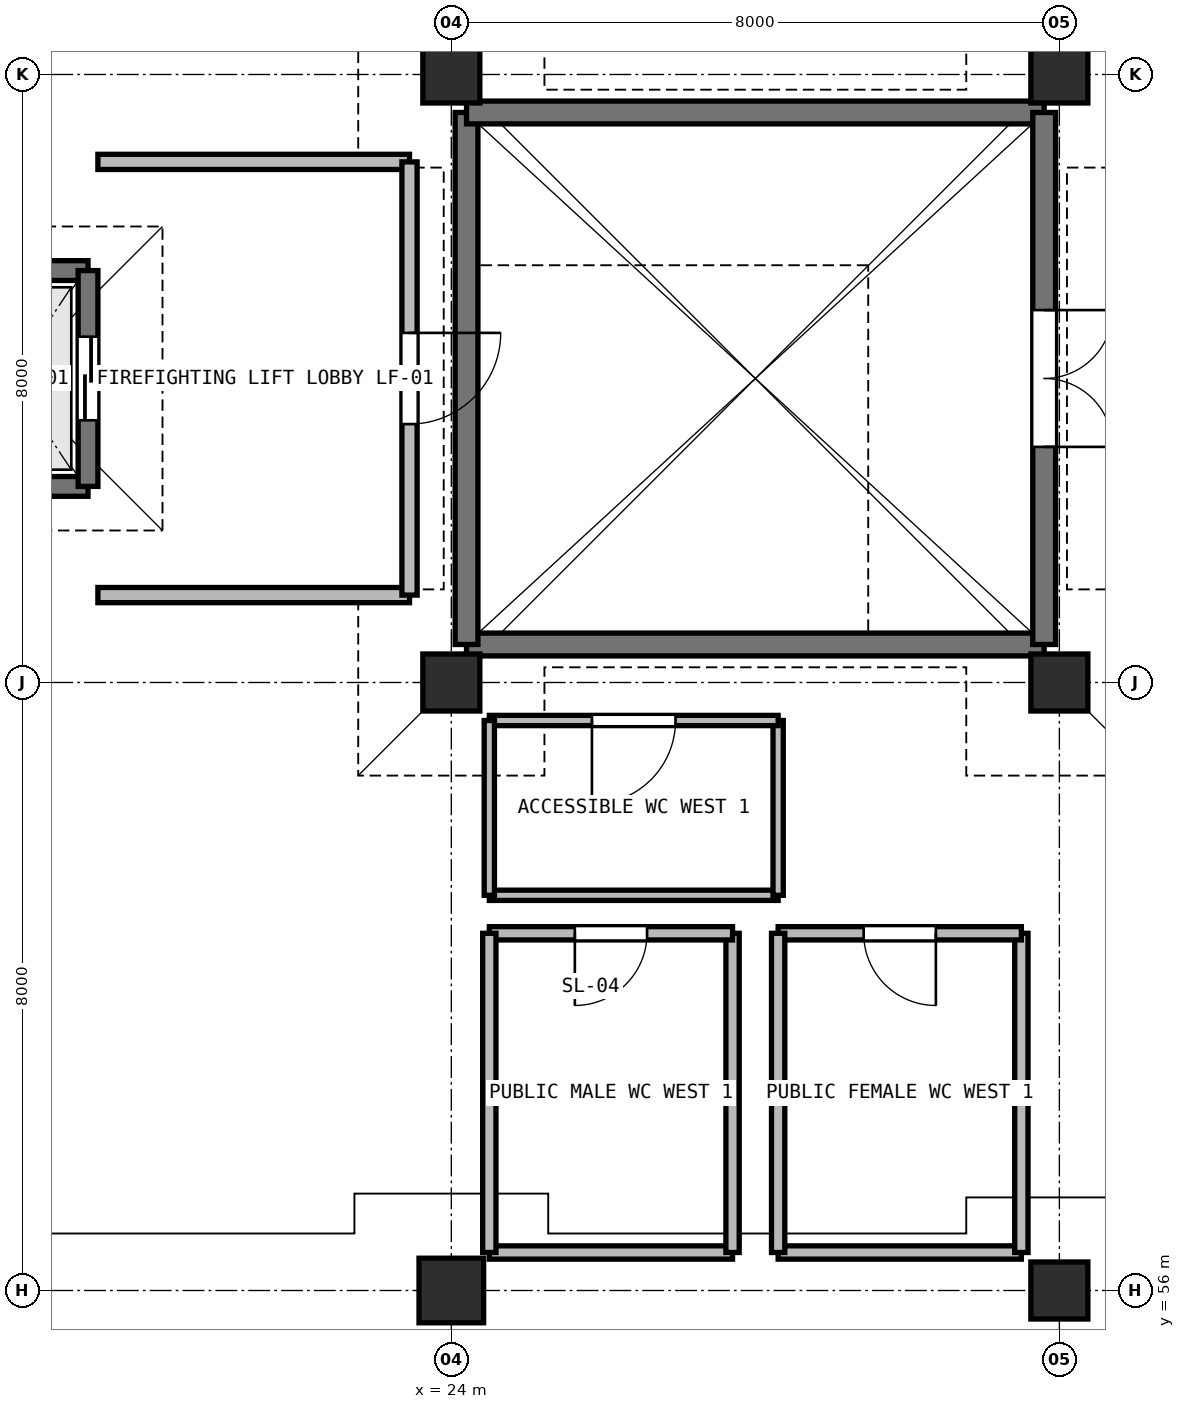
"""IFC4 building model, lengths in metres.
Left out: names, types, materials, properties, quantities, classifications, styles, units other than length and angle.
Written with IfcOpenShell. Run it as: python <this file> out.ifc"""

import sys

from ifc_helpers import new_model, si_unit, direction, frame, frame_2d, origin, origin_2d, place, context, subcontext, project, spatial, rectangle, extrude, element, fill, save


model = new_model("IFC4")
c1 = context("Model", 3, precision=1e-05, world=origin(), true_north=direction((0.0, 1.0)))
c2 = subcontext(c1, "Body", "Model", "MODEL_VIEW")
j1 = project(units=[si_unit("LENGTHUNIT", "METRE"), si_unit("PLANEANGLEUNIT", "RADIAN")], contexts=[c1])
p1 = place(None, origin())
s1 = spatial("IfcSite", under=j1, at=p1, CompositionType="ELEMENT")
p2 = place(p1, origin())
s2 = spatial("IfcBuilding", under=s1, at=p2, CompositionType="ELEMENT")
p3 = place(p2, frame((0.0, 0.0, 5.4)))
s3 = spatial("IfcBuildingStorey", under=s2, at=p3, CompositionType="ELEMENT", Elevation=5.4)
p4 = place(p3, frame((24.0, 56.0, 0.0), z_axis=(0.0, 0.0, 1.0), x_axis=(1.0, 0.0, 0.0)))
e1 = element("IfcColumn", 1, at=p4, inside=s3, PredefinedType="COLUMN", context=c2, shape_type="SweptSolid", body=[
    extrude(rectangle(XDim=0.85, YDim=0.85, at=origin_2d()), origin(), (0.0, 0.0, 1.0), 4.8),
])
for number, where, z_axis, x_axis in (
    (2, (24.0, 64.0, 0.0), (0.0, 0.0, 1.0), (1.0, 0.0, 0.0)),
    (3, (24.0, 72.0, 0.0), (0.0, 0.0, 1.0), (1.0, 0.0, 0.0)),
    (4, (32.0, 56.0, 0.0), (0.0, 0.0, 1.0), (1.0, 0.0, 0.0)),
    (5, (32.0, 64.0, 0.0), (0.0, 0.0, 1.0), (1.0, 0.0, 0.0)),
    (6, (32.0, 72.0, 0.0), (0.0, 0.0, 1.0), (1.0, 0.0, 0.0)),
):
    element("IfcColumn", number, at=place(p3, frame(where, z_axis=z_axis, x_axis=x_axis)), inside=s3, PredefinedType="COLUMN", context=c2, shape_type="SweptSolid", body=[
        extrude(rectangle(XDim=0.75, YDim=0.75, at=origin_2d()), origin(), (0.0, 0.0, 1.0), 4.8),
    ])
p5 = place(p3, frame((31.8, 64.5, 0.0), z_axis=(0.0, 0.0, 1.0), x_axis=(-1.0, 0.0, 0.0)))
e7 = element("IfcWall", 7, at=p5, inside=s3, PredefinedType="SHEAR", context=c2, shape_type="SweptSolid", body=[
    extrude(rectangle(XDim=7.6, YDim=0.3, at=frame_2d((3.8, 0.0))), origin(), (0.0, 0.0, 1.0), 4.48),
])
p6 = place(p3, frame((24.2, 64.5, 0.0), z_axis=(0.0, 0.0, 1.0), x_axis=(0.0, 1.0, 0.0)))
e8 = element("IfcWall", 8, at=p6, inside=s3, PredefinedType="SHEAR", context=c2, shape_type="SweptSolid", body=[
    extrude(rectangle(XDim=7.0, YDim=0.3, at=frame_2d((3.5, 0.0))), origin(), (0.0, 0.0, 1.0), 4.48),
])
p7 = place(p3, frame((24.2, 71.5, 0.0), z_axis=(0.0, 0.0, 1.0), x_axis=(1.0, 0.0, 0.0)))
e9 = element("IfcWall", 9, at=p7, inside=s3, PredefinedType="SHEAR", context=c2, shape_type="SweptSolid", body=[
    extrude(rectangle(XDim=7.6, YDim=0.3, at=frame_2d((3.8, 0.0))), origin(), (0.0, 0.0, 1.0), 4.48),
])
p8 = place(p3, frame((31.8, 71.5, 0.0), z_axis=(0.0, 0.0, 1.0), x_axis=(0.0, -1.0, 0.0)))
e10 = element("IfcWall", 10, at=p8, inside=s3, PredefinedType="SHEAR", context=c2, shape_type="SweptSolid", body=[
    extrude(rectangle(XDim=7.0, YDim=0.3, at=frame_2d((3.5, 0.0))), origin(), (0.0, 0.0, 1.0), 4.48),
])
p9 = place(p8, frame((2.6, 0.0, 0.0)))
e11 = element("IfcOpeningElement", 11, at=p9, cuts=e10, PredefinedType="OPENING", context=c2, shape_type="SweptSolid", body=[
    extrude(rectangle(XDim=1.8, YDim=2.2, at=frame_2d((0.9, 1.1))), frame((0.0, 0.16, 0.0), z_axis=(0.0, -1.0, 0.0), x_axis=(1.0, 0.0, 0.0)), (0.0, 0.0, 1.0), 0.32),
])
for number, where, z_axis, x_axis in (
    (12, (17.18, 69.42, 0.0), (0.0, 0.0, 1.0), (1.0, 0.0, 0.0)),
    (13, (19.22, 66.58, 0.0), (0.0, 0.0, 1.0), (-1.0, 0.0, 0.0)),
):
    element("IfcWall", number, at=place(p3, frame(where, z_axis=z_axis, x_axis=x_axis)), inside=s3, PredefinedType="SHEAR", context=c2, shape_type="SweptSolid", body=[
        extrude(rectangle(XDim=2.04, YDim=0.26, at=frame_2d((1.02, 0.0))), origin(), (0.0, 0.0, 1.0), 4.48),
    ])
p10 = place(p3, frame((19.22, 69.42, 0.0), z_axis=(0.0, 0.0, 1.0), x_axis=(0.0, -1.0, 0.0)))
e14 = element("IfcWall", 14, at=p10, inside=s3, PredefinedType="SHEAR", context=c2, shape_type="SweptSolid", body=[
    extrude(rectangle(XDim=2.84, YDim=0.26, at=frame_2d((1.42, 0.0))), origin(), (0.0, 0.0, 1.0), 4.48),
])
p11 = place(p10, frame((0.87, 0.0, 0.0)))
e15 = element("IfcOpeningElement", 15, at=p11, cuts=e14, PredefinedType="OPENING", context=c2, shape_type="SweptSolid", body=[
    extrude(rectangle(XDim=1.1, YDim=2.15, at=frame_2d((0.55, 1.075))), frame((0.0, 0.14, 0.0), z_axis=(0.0, -1.0, 0.0), x_axis=(1.0, 0.0, 0.0)), (0.0, 0.0, 1.0), 0.28),
])
for number, where, z_axis, x_axis in (
    (16, (19.35, 70.85, 0.0), (0.0, 0.0, 1.0), (1.0, 0.0, 0.0)),
    (17, (23.45, 65.15, 0.0), (0.0, 0.0, 1.0), (-1.0, 0.0, 0.0)),
):
    element("IfcWall", number, at=place(p3, frame(where, z_axis=z_axis, x_axis=x_axis)), inside=s3, PredefinedType="PARTITIONING", context=c2, shape_type="SweptSolid", body=[
        extrude(rectangle(XDim=4.1, YDim=0.2, at=frame_2d((2.05, 0.0))), origin(), (0.0, 0.0, 1.0), 4.48),
    ])
p12 = place(p3, frame((23.45, 70.85, 0.0), z_axis=(0.0, 0.0, 1.0), x_axis=(0.0, -1.0, 0.0)))
e18 = element("IfcWall", 18, at=p12, inside=s3, PredefinedType="PARTITIONING", context=c2, shape_type="SweptSolid", body=[
    extrude(rectangle(XDim=5.7, YDim=0.2, at=frame_2d((2.85, 0.0))), origin(), (0.0, 0.0, 1.0), 3.45),
])
p13 = place(p12, frame((2.25, 0.0, 0.0)))
e19 = element("IfcOpeningElement", 19, at=p13, cuts=e18, PredefinedType="OPENING", context=c2, shape_type="SweptSolid", body=[
    extrude(rectangle(XDim=1.2, YDim=2.2, at=frame_2d((0.6, 1.1))), frame((0.0, 0.11, 0.0), z_axis=(0.0, -1.0, 0.0), x_axis=(1.0, 0.0, 0.0)), (0.0, 0.0, 1.0), 0.22),
])
p14 = place(p3, frame((24.5, 56.5, 0.0), z_axis=(0.0, 0.0, 1.0), x_axis=(1.0, 0.0, 0.0)))
e20 = element("IfcWall", 20, at=p14, inside=s3, PredefinedType="PARTITIONING", context=c2, shape_type="SweptSolid", body=[
    extrude(rectangle(XDim=3.2, YDim=0.175, at=frame_2d((1.6, 0.0))), origin(), (0.0, 0.0, 1.0), 3.45),
])
p15 = place(p3, frame((27.7, 56.5, 0.0), z_axis=(0.0, 0.0, 1.0), x_axis=(0.0, 1.0, 0.0)))
e21 = element("IfcWall", 21, at=p15, inside=s3, PredefinedType="PARTITIONING", context=c2, shape_type="SweptSolid", body=[
    extrude(rectangle(XDim=4.2, YDim=0.175, at=frame_2d((2.1, 0.0))), origin(), (0.0, 0.0, 1.0), 4.48),
])
p16 = place(p3, frame((27.7, 60.7, 0.0), z_axis=(0.0, 0.0, 1.0), x_axis=(-1.0, 0.0, 0.0)))
e22 = element("IfcWall", 22, at=p16, inside=s3, PredefinedType="PARTITIONING", context=c2, shape_type="SweptSolid", body=[
    extrude(rectangle(XDim=3.2, YDim=0.175, at=frame_2d((1.6, 0.0))), origin(), (0.0, 0.0, 1.0), 4.1),
])
p17 = place(p16, frame((1.125, 0.0, 0.0)))
e23 = element("IfcOpeningElement", 23, at=p17, cuts=e22, PredefinedType="OPENING", context=c2, shape_type="SweptSolid", body=[
    extrude(rectangle(XDim=0.95, YDim=2.15, at=frame_2d((0.475, 1.075))), frame((0.0, 0.098, 0.0), z_axis=(0.0, -1.0, 0.0), x_axis=(1.0, 0.0, 0.0)), (0.0, 0.0, 1.0), 0.195),
])
p18 = place(p3, frame((24.5, 60.7, 0.0), z_axis=(0.0, 0.0, 1.0), x_axis=(0.0, -1.0, 0.0)))
e24 = element("IfcWall", 24, at=p18, inside=s3, PredefinedType="PARTITIONING", context=c2, shape_type="SweptSolid", body=[
    extrude(rectangle(XDim=4.2, YDim=0.175, at=frame_2d((2.1, 0.0))), origin(), (0.0, 0.0, 1.0), 3.45),
])
p19 = place(p3, frame((28.3, 56.5, 0.0), z_axis=(0.0, 0.0, 1.0), x_axis=(1.0, 0.0, 0.0)))
e25 = element("IfcWall", 25, at=p19, inside=s3, PredefinedType="PARTITIONING", context=c2, shape_type="SweptSolid", body=[
    extrude(rectangle(XDim=3.2, YDim=0.175, at=frame_2d((1.6, 0.0))), origin(), (0.0, 0.0, 1.0), 3.45),
])
p20 = place(p3, frame((31.5, 56.5, 0.0), z_axis=(0.0, 0.0, 1.0), x_axis=(0.0, 1.0, 0.0)))
e26 = element("IfcWall", 26, at=p20, inside=s3, PredefinedType="PARTITIONING", context=c2, shape_type="SweptSolid", body=[
    extrude(rectangle(XDim=4.2, YDim=0.175, at=frame_2d((2.1, 0.0))), origin(), (0.0, 0.0, 1.0), 3.45),
])
p21 = place(p3, frame((31.5, 60.7, 0.0), z_axis=(0.0, 0.0, 1.0), x_axis=(-1.0, 0.0, 0.0)))
e27 = element("IfcWall", 27, at=p21, inside=s3, PredefinedType="PARTITIONING", context=c2, shape_type="SweptSolid", body=[
    extrude(rectangle(XDim=3.2, YDim=0.175, at=frame_2d((1.6, 0.0))), origin(), (0.0, 0.0, 1.0), 4.1),
])
p22 = place(p21, frame((1.125, 0.0, 0.0)))
e28 = element("IfcOpeningElement", 28, at=p22, cuts=e27, PredefinedType="OPENING", context=c2, shape_type="SweptSolid", body=[
    extrude(rectangle(XDim=0.95, YDim=2.15, at=frame_2d((0.475, 1.075))), frame((0.0, 0.098, 0.0), z_axis=(0.0, -1.0, 0.0), x_axis=(1.0, 0.0, 0.0)), (0.0, 0.0, 1.0), 0.195),
])
p23 = place(p3, frame((28.3, 60.7, 0.0), z_axis=(0.0, 0.0, 1.0), x_axis=(0.0, -1.0, 0.0)))
e29 = element("IfcWall", 29, at=p23, inside=s3, PredefinedType="PARTITIONING", context=c2, shape_type="SweptSolid", body=[
    extrude(rectangle(XDim=4.2, YDim=0.175, at=frame_2d((2.1, 0.0))), origin(), (0.0, 0.0, 1.0), 4.48),
])
p24 = place(p3, frame((24.5, 61.2, 0.0), z_axis=(0.0, 0.0, 1.0), x_axis=(1.0, 0.0, 0.0)))
e30 = element("IfcWall", 30, at=p24, inside=s3, PredefinedType="PARTITIONING", context=c2, shape_type="SweptSolid", body=[
    extrude(rectangle(XDim=3.8, YDim=0.135, at=frame_2d((1.9, 0.0))), origin(), (0.0, 0.0, 1.0), 4.48),
])
p25 = place(p3, frame((28.3, 61.2, 0.0), z_axis=(0.0, 0.0, 1.0), x_axis=(0.0, 1.0, 0.0)))
e31 = element("IfcWall", 31, at=p25, inside=s3, PredefinedType="PARTITIONING", context=c2, shape_type="SweptSolid", body=[
    extrude(rectangle(XDim=2.3, YDim=0.135, at=frame_2d((1.15, 0.0))), origin(), (0.0, 0.0, 1.0), 4.48),
])
p26 = place(p3, frame((28.3, 63.5, 0.0), z_axis=(0.0, 0.0, 1.0), x_axis=(-1.0, 0.0, 0.0)))
e32 = element("IfcWall", 32, at=p26, inside=s3, PredefinedType="PARTITIONING", context=c2, shape_type="SweptSolid", body=[
    extrude(rectangle(XDim=3.8, YDim=0.135, at=frame_2d((1.9, 0.0))), origin(), (0.0, 0.0, 1.0), 3.45),
])
p27 = place(p26, frame((1.35, 0.0, 0.0)))
e33 = element("IfcOpeningElement", 33, at=p27, cuts=e32, PredefinedType="OPENING", context=c2, shape_type="SweptSolid", body=[
    extrude(rectangle(XDim=1.1, YDim=2.15, at=frame_2d((0.55, 1.075))), frame((0.0, 0.078, 0.0), z_axis=(0.0, -1.0, 0.0), x_axis=(1.0, 0.0, 0.0)), (0.0, 0.0, 1.0), 0.155),
])
p28 = place(p3, frame((24.5, 63.5, 0.0), z_axis=(0.0, 0.0, 1.0), x_axis=(0.0, -1.0, 0.0)))
e34 = element("IfcWall", 34, at=p28, inside=s3, PredefinedType="PARTITIONING", context=c2, shape_type="SweptSolid", body=[
    extrude(rectangle(XDim=2.3, YDim=0.135, at=frame_2d((1.15, 0.0))), origin(), (0.0, 0.0, 1.0), 3.45),
])
p29 = place(p9, frame((1.8, 0.0, 0.0), z_axis=(0.0, 0.0, 1.0), x_axis=(-1.0, 0.0, 0.0)))
e35 = element("IfcDoor", 35, at=p29, inside=s3, OperationType="DOUBLE_DOOR_SINGLE_SWING", PredefinedType="DOOR", context=c2, shape_type="SweptSolid", body=[
    extrude(rectangle(XDim=1.8, YDim=2.2, at=frame_2d((0.9, 1.1))), frame((0.0, 0.025, 0.0), z_axis=(0.0, -1.0, 0.0), x_axis=(1.0, 0.0, 0.0)), (0.0, 0.0, 1.0), 0.05),
])
fill(e11, e35)
p30 = place(p11, origin())
e36 = element("IfcDoor", 36, at=p30, inside=s3, OperationType="SLIDING_TO_LEFT", PredefinedType="DOOR", context=c2, shape_type="SweptSolid", body=[
    extrude(rectangle(XDim=1.1, YDim=2.15, at=frame_2d((0.55, 1.075))), frame((0.0, 0.025, 0.0), z_axis=(0.0, -1.0, 0.0), x_axis=(1.0, 0.0, 0.0)), (0.0, 0.0, 1.0), 0.05),
])
fill(e15, e36)
p31 = place(p13, origin())
e37 = element("IfcDoor", 37, at=p31, inside=s3, OperationType="SINGLE_SWING_LEFT", PredefinedType="DOOR", context=c2, shape_type="SweptSolid", body=[
    extrude(rectangle(XDim=1.2, YDim=2.2, at=frame_2d((0.6, 1.1))), frame((0.0, 0.025, 0.0), z_axis=(0.0, -1.0, 0.0), x_axis=(1.0, 0.0, 0.0)), (0.0, 0.0, 1.0), 0.05),
])
fill(e19, e37)
p32 = place(p17, origin())
e38 = element("IfcDoor", 38, at=p32, inside=s3, OperationType="SINGLE_SWING_RIGHT", PredefinedType="DOOR", context=c2, shape_type="SweptSolid", body=[
    extrude(rectangle(XDim=0.95, YDim=2.15, at=frame_2d((0.475, 1.075))), frame((0.0, 0.025, 0.0), z_axis=(0.0, -1.0, 0.0), x_axis=(1.0, 0.0, 0.0)), (0.0, 0.0, 1.0), 0.05),
])
fill(e23, e38)
p33 = place(p22, origin())
e39 = element("IfcDoor", 39, at=p33, inside=s3, OperationType="SINGLE_SWING_LEFT", PredefinedType="DOOR", context=c2, shape_type="SweptSolid", body=[
    extrude(rectangle(XDim=0.95, YDim=2.15, at=frame_2d((0.475, 1.075))), frame((0.0, 0.025, 0.0), z_axis=(0.0, -1.0, 0.0), x_axis=(1.0, 0.0, 0.0)), (0.0, 0.0, 1.0), 0.05),
])
fill(e28, e39)
p34 = place(p27, origin())
e40 = element("IfcDoor", 40, at=p34, inside=s3, OperationType="SINGLE_SWING_RIGHT", PredefinedType="DOOR", context=c2, shape_type="SweptSolid", body=[
    extrude(rectangle(XDim=1.1, YDim=2.15, at=frame_2d((0.55, 1.075))), frame((0.0, 0.025, 0.0), z_axis=(0.0, -1.0, 0.0), x_axis=(1.0, 0.0, 0.0)), (0.0, 0.0, 1.0), 0.05),
])
fill(e33, e40)
save(model, sys.argv[1])
